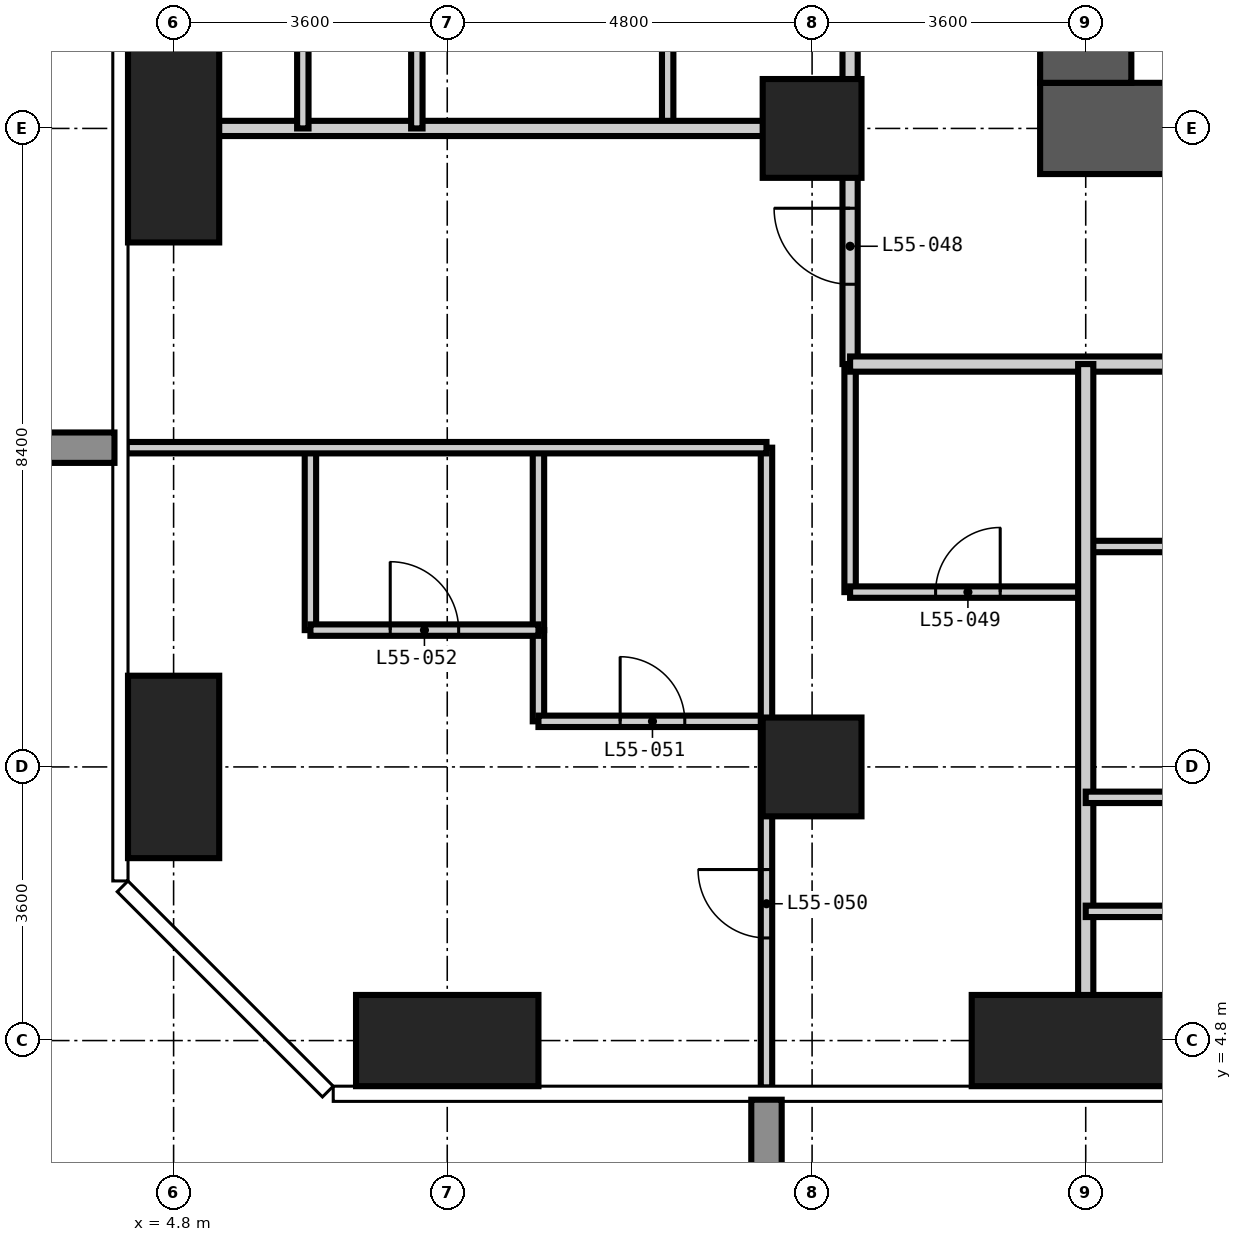
"""IFC4 building model, lengths in metres.
Left out: names, types, materials, properties, quantities, classifications, styles, units other than length and angle.
Written with IfcOpenShell. Run it as: python <this file> out.ifc"""

import sys

from ifc_helpers import new_model, si_unit, direction, frame, frame_2d, origin, origin_2d, place, context, subcontext, project, spatial, rectangle, extrude, element, fill, save


model = new_model("IFC4")
c1 = context("Model", 3, precision=1e-05, world=origin(), true_north=direction((0.0, 1.0)))
c2 = subcontext(c1, "Body", "Model", "MODEL_VIEW")
j1 = project(units=[si_unit("LENGTHUNIT", "METRE"), si_unit("PLANEANGLEUNIT", "RADIAN")], contexts=[c1])
p1 = place(None, origin())
s1 = spatial("IfcSite", under=j1, at=p1, CompositionType="ELEMENT")
p2 = place(p1, origin())
s2 = spatial("IfcBuilding", under=s1, at=p2, CompositionType="ELEMENT")
p3 = place(p2, frame((0.0, 0.0, 213.0)))
s3 = spatial("IfcBuildingStorey", under=s2, at=p3, CompositionType="ELEMENT", Elevation=213.0)
p4 = place(p3, frame((4.8, 8.4, -0.35), z_axis=(0.0, 0.0, 1.0), x_axis=(1.0, 0.0, 0.0)))
e1 = element("IfcColumn", 1, at=p4, inside=s3, PredefinedType="COLUMN", context=c2, shape_type="SweptSolid", body=[
    extrude(rectangle(XDim=1.2, YDim=2.4, at=origin_2d()), origin(), (0.0, 0.0, 1.0), 3.6),
])
p5 = place(p3, frame((4.8, 16.8, -0.35), z_axis=(0.0, 0.0, 1.0), x_axis=(1.0, 0.0, 0.0)))
e2 = element("IfcColumn", 2, at=p5, inside=s3, PredefinedType="COLUMN", context=c2, shape_type="SweptSolid", body=[
    extrude(rectangle(XDim=1.2, YDim=3.0, at=origin_2d()), origin(), (0.0, 0.0, 1.0), 3.6),
])
p6 = place(p3, frame((8.4, 4.8, -0.35), z_axis=(0.0, 0.0, 1.0), x_axis=(1.0, 0.0, 0.0)))
e3 = element("IfcColumn", 3, at=p6, inside=s3, PredefinedType="COLUMN", context=c2, shape_type="SweptSolid", body=[
    extrude(rectangle(XDim=2.4, YDim=1.2, at=origin_2d()), origin(), (0.0, 0.0, 1.0), 3.6),
])
for number, where, z_axis, x_axis in (
    (4, (13.2, 8.4, -0.35), (0.0, 0.0, 1.0), (1.0, 0.0, 0.0)),
    (5, (13.2, 16.8, -0.35), (0.0, 0.0, 1.0), (1.0, 0.0, 0.0)),
):
    element("IfcColumn", number, at=place(p3, frame(where, z_axis=z_axis, x_axis=x_axis)), inside=s3, PredefinedType="COLUMN", context=c2, shape_type="SweptSolid", body=[
        extrude(rectangle(XDim=1.3, YDim=1.3, at=origin_2d()), origin(), (0.0, 0.0, 1.0), 3.6),
    ])
p7 = place(p3, frame((16.8, 4.8, -0.35), z_axis=(0.0, 0.0, 1.0), x_axis=(1.0, 0.0, 0.0)))
e6 = element("IfcColumn", 6, at=p7, inside=s3, PredefinedType="COLUMN", context=c2, shape_type="SweptSolid", body=[
    extrude(rectangle(XDim=3.0, YDim=1.2, at=origin_2d()), origin(), (0.0, 0.0, 1.0), 3.6),
])
p8 = place(p3, frame((16.2, 16.8, -0.35), z_axis=(0.0, 0.0, 1.0), x_axis=(1.0, 0.0, 0.0)))
e7 = element("IfcWall", 7, at=p8, inside=s3, PredefinedType="SHEAR", context=c2, shape_type="SweptSolid", body=[
    extrude(rectangle(XDim=26.4, YDim=1.2, at=frame_2d((13.2, 0.0))), origin(), (0.0, 0.0, 1.0), 3.6),
])
p9 = place(p8, frame((12.7, 0.0, 0.35)))
e8 = element("IfcOpeningElement", 8, at=p9, cuts=e7, PredefinedType="OPENING", context=c2, shape_type="SweptSolid", body=[
    extrude(rectangle(XDim=1.0, YDim=2.1, at=frame_2d((0.5, 1.05))), frame((0.0, 0.61, 0.0), z_axis=(0.0, -1.0, 0.0), x_axis=(1.0, 0.0, 0.0)), (0.0, 0.0, 1.0), 1.22),
])
p10 = place(p8, frame((19.0, 0.0, 0.35)))
e9 = element("IfcOpeningElement", 9, at=p10, cuts=e7, PredefinedType="OPENING", context=c2, shape_type="SweptSolid", body=[
    extrude(rectangle(XDim=1.0, YDim=2.1, at=frame_2d((0.5, 1.05))), frame((0.0, 0.61, 0.0), z_axis=(0.0, -1.0, 0.0), x_axis=(1.0, 0.0, 0.0)), (0.0, 0.0, 1.0), 1.22),
])
p11 = place(p3, frame((16.8, 41.4, -0.35), z_axis=(0.0, 0.0, 1.0), x_axis=(0.0, -1.0, 0.0)))
e10 = element("IfcWall", 10, at=p11, inside=s3, PredefinedType="SHEAR", context=c2, shape_type="SweptSolid", body=[
    extrude(rectangle(XDim=24.0, YDim=1.2, at=frame_2d((12.0, 0.0))), origin(), (0.0, 0.0, 1.0), 3.6),
])
p12 = place(p11, frame((11.1, 0.0, 0.35)))
e11 = element("IfcOpeningElement", 11, at=p12, cuts=e10, PredefinedType="OPENING", context=c2, shape_type="SweptSolid", body=[
    extrude(rectangle(XDim=1.8, YDim=2.2, at=frame_2d((0.9, 1.1))), frame((0.0, 0.61, 0.0), z_axis=(0.0, -1.0, 0.0), x_axis=(1.0, 0.0, 0.0)), (0.0, 0.0, 1.0), 1.22),
])
p13 = place(p11, frame((19.9, 0.0, 0.35)))
e12 = element("IfcOpeningElement", 12, at=p13, cuts=e10, PredefinedType="OPENING", context=c2, shape_type="SweptSolid", body=[
    extrude(rectangle(XDim=1.0, YDim=2.1, at=frame_2d((0.5, 1.05))), frame((0.0, 0.61, 0.0), z_axis=(0.0, -1.0, 0.0), x_axis=(1.0, 0.0, 0.0)), (0.0, 0.0, 1.0), 1.22),
])
p14 = place(p11, frame((5.2, 0.0, 0.35)))
e13 = element("IfcOpeningElement", 13, at=p14, cuts=e10, PredefinedType="OPENING", context=c2, shape_type="SweptSolid", body=[
    extrude(rectangle(XDim=1.0, YDim=2.1, at=frame_2d((0.5, 1.05))), frame((0.0, 0.61, 0.0), z_axis=(0.0, -1.0, 0.0), x_axis=(1.0, 0.0, 0.0)), (0.0, 0.0, 1.0), 1.22),
])
p15 = place(p3, frame((9.6, 9.0, 0.0), z_axis=(0.0, 0.0, 1.0), x_axis=(0.0, 1.0, 0.0)))
e14 = element("IfcWall", 14, at=p15, inside=s3, PredefinedType="PARTITIONING", context=c2, shape_type="SweptSolid", body=[
    extrude(rectangle(XDim=1.2, YDim=0.15, at=frame_2d((0.6, 0.0))), origin(), (0.0, 0.0, 1.0), 3.25),
])
p16 = place(p3, frame((11.3, 16.8, 0.0), z_axis=(0.0, 0.0, 1.0), x_axis=(0.0, 1.0, 0.0)))
e15 = element("IfcWall", 15, at=p16, inside=s3, PredefinedType="PARTITIONING", context=c2, shape_type="SweptSolid", body=[
    extrude(rectangle(XDim=2.7, YDim=0.15, at=frame_2d((1.35, 0.0))), origin(), (0.0, 0.0, 1.0), 3.25),
])
p17 = place(p3, frame((13.7, 10.7, 0.0), z_axis=(0.0, 0.0, 1.0), x_axis=(0.0, 1.0, 0.0)))
e16 = element("IfcWall", 16, at=p17, inside=s3, PredefinedType="PARTITIONING", context=c2, shape_type="SweptSolid", body=[
    extrude(rectangle(XDim=3.0, YDim=0.15, at=frame_2d((1.5, 0.0))), origin(), (0.0, 0.0, 1.0), 3.25),
])
p18 = place(p3, frame((9.6, 9.0, 0.0), z_axis=(0.0, 0.0, 1.0), x_axis=(1.0, 0.0, 0.0)))
e17 = element("IfcWall", 17, at=p18, inside=s3, PredefinedType="PARTITIONING", context=c2, shape_type="SweptSolid", body=[
    extrude(rectangle(XDim=3.0, YDim=0.15, at=frame_2d((1.5, 0.0))), origin(), (0.0, 0.0, 1.0), 3.25),
])
p19 = place(p18, frame((1.075, 0.0, 0.0)))
e18 = element("IfcOpeningElement", 18, at=p19, cuts=e17, PredefinedType="OPENING", context=c2, shape_type="SweptSolid", body=[
    extrude(rectangle(XDim=0.85, YDim=2.1, at=frame_2d((0.425, 1.05))), frame((0.0, 0.085, 0.0), z_axis=(0.0, -1.0, 0.0), x_axis=(1.0, 0.0, 0.0)), (0.0, 0.0, 1.0), 0.17),
])
p20 = place(p3, frame((13.7, 10.7, 0.0), z_axis=(0.0, 0.0, 1.0), x_axis=(1.0, 0.0, 0.0)))
e19 = element("IfcWall", 19, at=p20, inside=s3, PredefinedType="PARTITIONING", context=c2, shape_type="SweptSolid", body=[
    extrude(rectangle(XDim=3.1, YDim=0.15, at=frame_2d((1.55, 0.0))), origin(), (0.0, 0.0, 1.0), 3.25),
])
p21 = place(p20, frame((1.125, 0.0, 0.0)))
e20 = element("IfcOpeningElement", 20, at=p21, cuts=e19, PredefinedType="OPENING", context=c2, shape_type="SweptSolid", body=[
    extrude(rectangle(XDim=0.85, YDim=2.1, at=frame_2d((0.425, 1.05))), frame((0.0, 0.085, 0.0), z_axis=(0.0, -1.0, 0.0), x_axis=(1.0, 0.0, 0.0)), (0.0, 0.0, 1.0), 0.17),
])
p22 = place(p3, frame((16.8, 11.3, 0.0), z_axis=(0.0, 0.0, 1.0), x_axis=(1.0, 0.0, 0.0)))
e21 = element("IfcWall", 21, at=p22, inside=s3, PredefinedType="PARTITIONING", context=c2, shape_type="SweptSolid", body=[
    extrude(rectangle(XDim=2.7, YDim=0.15, at=frame_2d((1.35, 0.0))), origin(), (0.0, 0.0, 1.0), 3.25),
])
p23 = place(p3, frame((13.7, 13.7, 0.0), z_axis=(0.0, 0.0, 1.0), x_axis=(0.0, 1.0, 0.0)))
e22 = element("IfcWall", 22, at=p23, inside=s3, PredefinedType="PARTITIONING", context=c2, shape_type="SweptSolid", body=[
    extrude(rectangle(XDim=30.8, YDim=0.2, at=frame_2d((15.4, 0.0))), origin(), (0.0, 0.0, 1.0), 3.25),
])
p24 = place(p23, frame((4.7, 0.0, 0.0)))
e23 = element("IfcOpeningElement", 23, at=p24, cuts=e22, PredefinedType="OPENING", context=c2, shape_type="SweptSolid", body=[
    extrude(rectangle(XDim=1.0, YDim=2.2, at=frame_2d((0.5, 1.1))), frame((0.0, 0.11, 0.0), z_axis=(0.0, -1.0, 0.0), x_axis=(1.0, 0.0, 0.0)), (0.0, 0.0, 1.0), 0.22),
])
p25 = place(p23, frame((12.2, 0.0, 0.0)))
e24 = element("IfcOpeningElement", 24, at=p25, cuts=e22, PredefinedType="OPENING", context=c2, shape_type="SweptSolid", body=[
    extrude(rectangle(XDim=1.0, YDim=2.2, at=frame_2d((0.5, 1.1))), frame((0.0, 0.11, 0.0), z_axis=(0.0, -1.0, 0.0), x_axis=(1.0, 0.0, 0.0)), (0.0, 0.0, 1.0), 0.22),
])
p26 = place(p23, frame((18.2, 0.0, 0.0)))
e25 = element("IfcOpeningElement", 25, at=p26, cuts=e22, PredefinedType="OPENING", context=c2, shape_type="SweptSolid", body=[
    extrude(rectangle(XDim=1.0, YDim=2.2, at=frame_2d((0.5, 1.1))), frame((0.0, 0.11, 0.0), z_axis=(0.0, -1.0, 0.0), x_axis=(1.0, 0.0, 0.0)), (0.0, 0.0, 1.0), 0.22),
])
p27 = place(p23, frame((25.7, 0.0, 0.0)))
e26 = element("IfcOpeningElement", 26, at=p27, cuts=e22, PredefinedType="OPENING", context=c2, shape_type="SweptSolid", body=[
    extrude(rectangle(XDim=1.0, YDim=2.2, at=frame_2d((0.5, 1.1))), frame((0.0, 0.11, 0.0), z_axis=(0.0, -1.0, 0.0), x_axis=(1.0, 0.0, 0.0)), (0.0, 0.0, 1.0), 0.22),
])
p28 = place(p23, frame((1.05, 0.0, 0.0)))
e27 = element("IfcOpeningElement", 27, at=p28, cuts=e22, PredefinedType="OPENING", context=c2, shape_type="SweptSolid", body=[
    extrude(rectangle(XDim=1.0, YDim=2.2, at=frame_2d((0.5, 1.1))), frame((0.0, 0.11, 0.0), z_axis=(0.0, -1.0, 0.0), x_axis=(1.0, 0.0, 0.0)), (0.0, 0.0, 1.0), 0.22),
])
p29 = place(p23, frame((29.05, 0.0, 0.0)))
e28 = element("IfcOpeningElement", 28, at=p29, cuts=e22, PredefinedType="OPENING", context=c2, shape_type="SweptSolid", body=[
    extrude(rectangle(XDim=1.0, YDim=2.2, at=frame_2d((0.5, 1.1))), frame((0.0, 0.11, 0.0), z_axis=(0.0, -1.0, 0.0), x_axis=(1.0, 0.0, 0.0)), (0.0, 0.0, 1.0), 0.22),
])
p30 = place(p3, frame((45.7, 13.7, 0.0), z_axis=(0.0, 0.0, 1.0), x_axis=(-1.0, 0.0, 0.0)))
e29 = element("IfcWall", 29, at=p30, inside=s3, PredefinedType="PARTITIONING", context=c2, shape_type="SweptSolid", body=[
    extrude(rectangle(XDim=32.0, YDim=0.2, at=frame_2d((16.0, 0.0))), origin(), (0.0, 0.0, 1.0), 3.25),
])
p31 = place(p30, frame((26.3, 0.0, 0.0)))
e30 = element("IfcOpeningElement", 30, at=p31, cuts=e29, PredefinedType="OPENING", context=c2, shape_type="SweptSolid", body=[
    extrude(rectangle(XDim=1.0, YDim=2.2, at=frame_2d((0.5, 1.1))), frame((0.0, 0.11, 0.0), z_axis=(0.0, -1.0, 0.0), x_axis=(1.0, 0.0, 0.0)), (0.0, 0.0, 1.0), 0.22),
])
p32 = place(p30, frame((22.1, 0.0, 0.0)))
e31 = element("IfcOpeningElement", 31, at=p32, cuts=e29, PredefinedType="OPENING", context=c2, shape_type="SweptSolid", body=[
    extrude(rectangle(XDim=1.0, YDim=2.2, at=frame_2d((0.5, 1.1))), frame((0.0, 0.11, 0.0), z_axis=(0.0, -1.0, 0.0), x_axis=(1.0, 0.0, 0.0)), (0.0, 0.0, 1.0), 0.22),
])
p33 = place(p30, frame((17.9, 0.0, 0.0)))
e32 = element("IfcOpeningElement", 32, at=p33, cuts=e29, PredefinedType="OPENING", context=c2, shape_type="SweptSolid", body=[
    extrude(rectangle(XDim=1.0, YDim=2.2, at=frame_2d((0.5, 1.1))), frame((0.0, 0.11, 0.0), z_axis=(0.0, -1.0, 0.0), x_axis=(1.0, 0.0, 0.0)), (0.0, 0.0, 1.0), 0.22),
])
p34 = place(p30, frame((13.7, 0.0, 0.0)))
e33 = element("IfcOpeningElement", 33, at=p34, cuts=e29, PredefinedType="OPENING", context=c2, shape_type="SweptSolid", body=[
    extrude(rectangle(XDim=1.0, YDim=2.2, at=frame_2d((0.5, 1.1))), frame((0.0, 0.11, 0.0), z_axis=(0.0, -1.0, 0.0), x_axis=(1.0, 0.0, 0.0)), (0.0, 0.0, 1.0), 0.22),
])
p35 = place(p30, frame((9.5, 0.0, 0.0)))
e34 = element("IfcOpeningElement", 34, at=p35, cuts=e29, PredefinedType="OPENING", context=c2, shape_type="SweptSolid", body=[
    extrude(rectangle(XDim=1.0, YDim=2.2, at=frame_2d((0.5, 1.1))), frame((0.0, 0.11, 0.0), z_axis=(0.0, -1.0, 0.0), x_axis=(1.0, 0.0, 0.0)), (0.0, 0.0, 1.0), 0.22),
])
p36 = place(p30, frame((5.3, 0.0, 0.0)))
e35 = element("IfcOpeningElement", 35, at=p36, cuts=e29, PredefinedType="OPENING", context=c2, shape_type="SweptSolid", body=[
    extrude(rectangle(XDim=1.0, YDim=2.2, at=frame_2d((0.5, 1.1))), frame((0.0, 0.11, 0.0), z_axis=(0.0, -1.0, 0.0), x_axis=(1.0, 0.0, 0.0)), (0.0, 0.0, 1.0), 0.22),
])
for number, where, z_axis, x_axis in (
    (36, (16.8, 4.182, 0.0), (0.0, 0.0, 1.0), (0.0, 1.0, 0.0)),
    (37, (4.182, 16.8, 0.0), (0.0, 0.0, 1.0), (1.0, 0.0, 0.0)),
):
    element("IfcWall", number, at=place(p3, frame(where, z_axis=z_axis, x_axis=x_axis)), inside=s3, PredefinedType="PARTITIONING", context=c2, shape_type="SweptSolid", body=[
        extrude(rectangle(XDim=9.518, YDim=0.2, at=frame_2d((4.759, 0.0))), origin(), (0.0, 0.0, 1.0), 3.25),
    ])
p37 = place(p3, frame((6.5, 16.8, 0.0), z_axis=(0.0, 0.0, 1.0), x_axis=(0.0, 1.0, 0.0)))
e38 = element("IfcWall", 38, at=p37, inside=s3, PredefinedType="PARTITIONING", context=c2, shape_type="SweptSolid", body=[
    extrude(rectangle(XDim=2.7, YDim=0.15, at=frame_2d((1.35, 0.0))), origin(), (0.0, 0.0, 1.0), 3.25),
])
p38 = place(p37, frame((1.6, 0.0, 0.0)))
e39 = element("IfcOpeningElement", 39, at=p38, cuts=e38, PredefinedType="OPENING", context=c2, shape_type="SweptSolid", body=[
    extrude(rectangle(XDim=0.9, YDim=2.1, at=frame_2d((0.45, 1.05))), frame((0.0, 0.085, 0.0), z_axis=(0.0, -1.0, 0.0), x_axis=(1.0, 0.0, 0.0)), (0.0, 0.0, 1.0), 0.17),
])
p39 = place(p3, frame((6.6, 10.2, 0.0), z_axis=(0.0, 0.0, 1.0), x_axis=(0.0, 1.0, 0.0)))
e40 = element("IfcWall", 40, at=p39, inside=s3, PredefinedType="PARTITIONING", context=c2, shape_type="SweptSolid", body=[
    extrude(rectangle(XDim=2.4, YDim=0.15, at=frame_2d((1.2, 0.0))), origin(), (0.0, 0.0, 1.0), 3.25),
])
p40 = place(p3, frame((8.0, 16.8, 0.0), z_axis=(0.0, 0.0, 1.0), x_axis=(0.0, 1.0, 0.0)))
e41 = element("IfcWall", 41, at=p40, inside=s3, PredefinedType="PARTITIONING", context=c2, shape_type="SweptSolid", body=[
    extrude(rectangle(XDim=2.7, YDim=0.15, at=frame_2d((1.35, 0.0))), origin(), (0.0, 0.0, 1.0), 3.25),
])
p41 = place(p3, frame((9.6, 10.2, 0.0), z_axis=(0.0, 0.0, 1.0), x_axis=(0.0, 1.0, 0.0)))
e42 = element("IfcWall", 42, at=p41, inside=s3, PredefinedType="PARTITIONING", context=c2, shape_type="SweptSolid", body=[
    extrude(rectangle(XDim=2.4, YDim=0.15, at=frame_2d((1.2, 0.0))), origin(), (0.0, 0.0, 1.0), 3.25),
])
p42 = place(p3, frame((12.6, 4.182, 0.0), z_axis=(0.0, 0.0, 1.0), x_axis=(0.0, 1.0, 0.0)))
e43 = element("IfcWall", 43, at=p42, inside=s3, PredefinedType="PARTITIONING", context=c2, shape_type="SweptSolid", body=[
    extrude(rectangle(XDim=8.418, YDim=0.15, at=frame_2d((4.209, 0.0))), origin(), (0.0, 0.0, 1.0), 3.25),
])
p43 = place(p42, frame((1.968, 0.0, 0.0)))
e44 = element("IfcOpeningElement", 44, at=p43, cuts=e43, PredefinedType="OPENING", context=c2, shape_type="SweptSolid", body=[
    extrude(rectangle(XDim=0.9, YDim=2.1, at=frame_2d((0.45, 1.05))), frame((0.0, 0.085, 0.0), z_axis=(0.0, -1.0, 0.0), x_axis=(1.0, 0.0, 0.0)), (0.0, 0.0, 1.0), 0.17),
])
p44 = place(p3, frame((16.8, 6.5, 0.0), z_axis=(0.0, 0.0, 1.0), x_axis=(1.0, 0.0, 0.0)))
e45 = element("IfcWall", 45, at=p44, inside=s3, PredefinedType="PARTITIONING", context=c2, shape_type="SweptSolid", body=[
    extrude(rectangle(XDim=2.7, YDim=0.15, at=frame_2d((1.35, 0.0))), origin(), (0.0, 0.0, 1.0), 3.25),
])
p45 = place(p44, frame((1.6, 0.0, 0.0)))
e46 = element("IfcOpeningElement", 46, at=p45, cuts=e45, PredefinedType="OPENING", context=c2, shape_type="SweptSolid", body=[
    extrude(rectangle(XDim=0.9, YDim=2.1, at=frame_2d((0.45, 1.05))), frame((0.0, 0.085, 0.0), z_axis=(0.0, -1.0, 0.0), x_axis=(1.0, 0.0, 0.0)), (0.0, 0.0, 1.0), 0.17),
])
p46 = place(p3, frame((16.8, 8.0, 0.0), z_axis=(0.0, 0.0, 1.0), x_axis=(1.0, 0.0, 0.0)))
e47 = element("IfcWall", 47, at=p46, inside=s3, PredefinedType="PARTITIONING", context=c2, shape_type="SweptSolid", body=[
    extrude(rectangle(XDim=2.7, YDim=0.15, at=frame_2d((1.35, 0.0))), origin(), (0.0, 0.0, 1.0), 3.25),
])
p47 = place(p3, frame((6.6, 10.2, 0.0), z_axis=(0.0, 0.0, 1.0), x_axis=(1.0, 0.0, 0.0)))
e48 = element("IfcWall", 48, at=p47, inside=s3, PredefinedType="PARTITIONING", context=c2, shape_type="SweptSolid", body=[
    extrude(rectangle(XDim=3.0, YDim=0.15, at=frame_2d((1.5, 0.0))), origin(), (0.0, 0.0, 1.0), 3.25),
])
p48 = place(p47, frame((1.05, 0.0, 0.0)))
e49 = element("IfcOpeningElement", 49, at=p48, cuts=e48, PredefinedType="OPENING", context=c2, shape_type="SweptSolid", body=[
    extrude(rectangle(XDim=0.9, YDim=2.1, at=frame_2d((0.45, 1.05))), frame((0.0, 0.085, 0.0), z_axis=(0.0, -1.0, 0.0), x_axis=(1.0, 0.0, 0.0)), (0.0, 0.0, 1.0), 0.17),
])
p49 = place(p3, frame((4.182, 12.6, 0.0), z_axis=(0.0, 0.0, 1.0), x_axis=(1.0, 0.0, 0.0)))
e50 = element("IfcWall", 50, at=p49, inside=s3, PredefinedType="PARTITIONING", context=c2, shape_type="SweptSolid", body=[
    extrude(rectangle(XDim=8.418, YDim=0.15, at=frame_2d((4.209, 0.0))), origin(), (0.0, 0.0, 1.0), 3.25),
])
p50 = place(p28, origin())
e51 = element("IfcDoor", 51, at=p50, inside=s3, OperationType="SINGLE_SWING_RIGHT", PredefinedType="DOOR", context=c2, shape_type="SweptSolid", body=[
    extrude(rectangle(XDim=1.0, YDim=2.2, at=frame_2d((0.5, 1.1))), frame((0.0, 0.025, 0.0), z_axis=(0.0, -1.0, 0.0), x_axis=(1.0, 0.0, 0.0)), (0.0, 0.0, 1.0), 0.05),
])
fill(e27, e51)
p51 = place(p21, origin())
e52 = element("IfcDoor", 52, at=p51, inside=s3, OperationType="SINGLE_SWING_RIGHT", PredefinedType="DOOR", context=c2, shape_type="SweptSolid", body=[
    extrude(rectangle(XDim=0.85, YDim=2.1, at=frame_2d((0.425, 1.05))), frame((0.0, 0.025, 0.0), z_axis=(0.0, -1.0, 0.0), x_axis=(1.0, 0.0, 0.0)), (0.0, 0.0, 1.0), 0.05),
])
fill(e20, e52)
p52 = place(p43, origin())
e53 = element("IfcDoor", 53, at=p52, inside=s3, OperationType="SINGLE_SWING_RIGHT", PredefinedType="DOOR", context=c2, shape_type="SweptSolid", body=[
    extrude(rectangle(XDim=0.9, YDim=2.1, at=frame_2d((0.45, 1.05))), frame((0.0, 0.025, 0.0), z_axis=(0.0, -1.0, 0.0), x_axis=(1.0, 0.0, 0.0)), (0.0, 0.0, 1.0), 0.05),
])
fill(e44, e53)
p53 = place(p19, origin())
e54 = element("IfcDoor", 54, at=p53, inside=s3, OperationType="SINGLE_SWING_LEFT", PredefinedType="DOOR", context=c2, shape_type="SweptSolid", body=[
    extrude(rectangle(XDim=0.85, YDim=2.1, at=frame_2d((0.425, 1.05))), frame((0.0, 0.025, 0.0), z_axis=(0.0, -1.0, 0.0), x_axis=(1.0, 0.0, 0.0)), (0.0, 0.0, 1.0), 0.05),
])
fill(e18, e54)
p54 = place(p48, origin())
e55 = element("IfcDoor", 55, at=p54, inside=s3, OperationType="SINGLE_SWING_LEFT", PredefinedType="DOOR", context=c2, shape_type="SweptSolid", body=[
    extrude(rectangle(XDim=0.9, YDim=2.1, at=frame_2d((0.45, 1.05))), frame((0.0, 0.025, 0.0), z_axis=(0.0, -1.0, 0.0), x_axis=(1.0, 0.0, 0.0)), (0.0, 0.0, 1.0), 0.05),
])
fill(e49, e55)
save(model, sys.argv[1])
